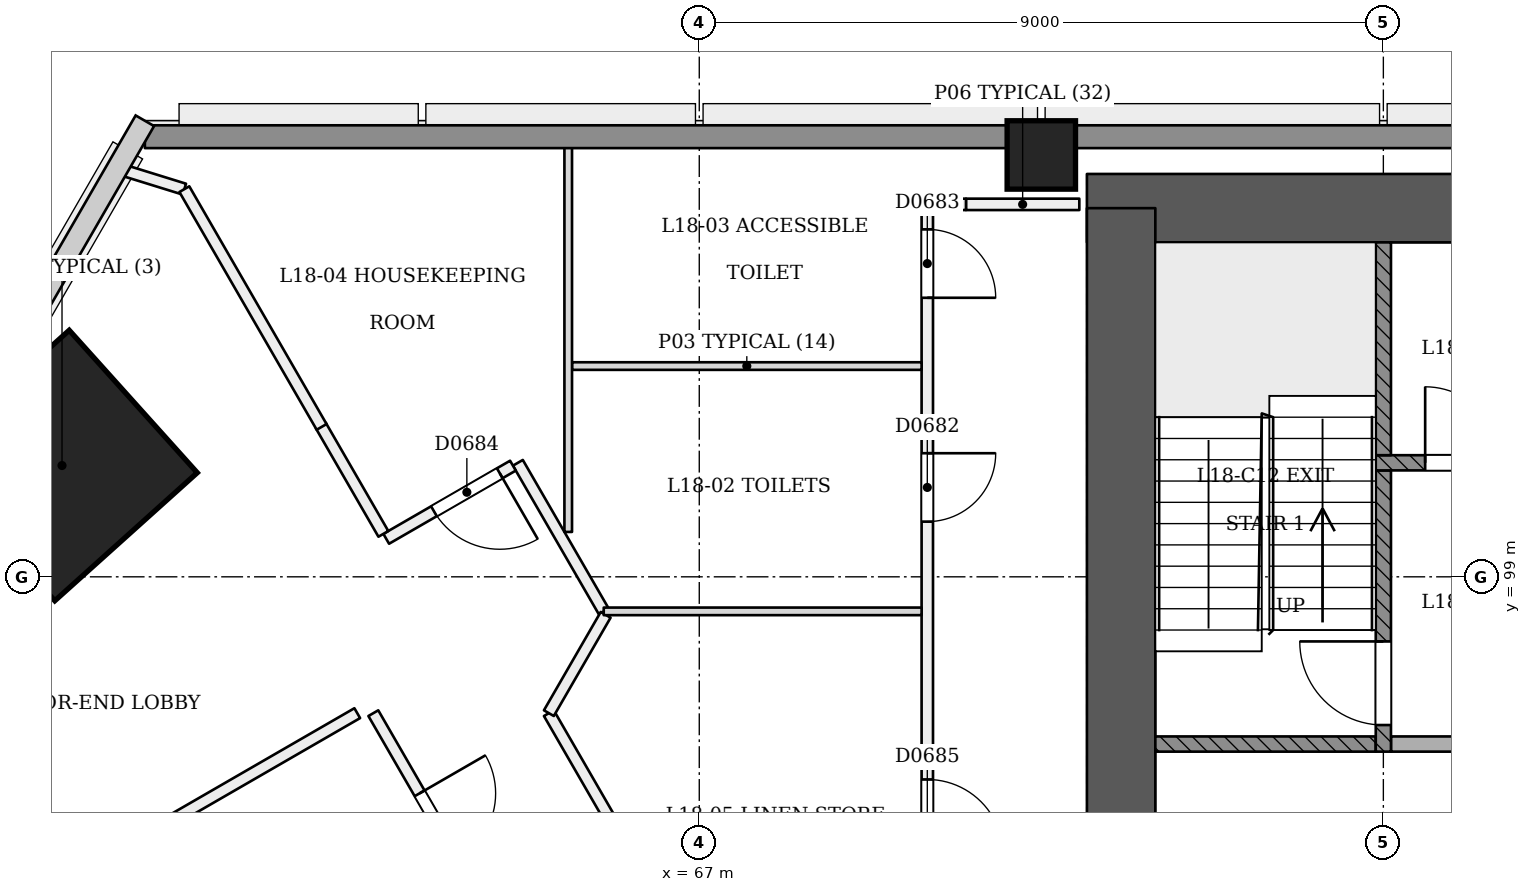
"""IFC4 building model, lengths in metres.
Left out: names, types, materials, properties, quantities, classifications, styles, units other than length and angle.
Written with IfcOpenShell. Run it as: python <this file> out.ifc"""

import sys

from ifc_helpers import new_model, si_unit, direction, frame, frame_2d, origin, origin_2d, place, context, subcontext, project, spatial, rectangle, extrude, element, fill, save


model = new_model("IFC4")
c1 = context("Model", 3, precision=1e-05, world=origin(), true_north=direction((0.0, 1.0)))
c2 = subcontext(c1, "Body", "Model", "MODEL_VIEW")
j1 = project(units=[si_unit("LENGTHUNIT", "METRE"), si_unit("PLANEANGLEUNIT", "RADIAN")], contexts=[c1])
p1 = place(None, origin())
s1 = spatial("IfcSite", under=j1, at=p1, CompositionType="ELEMENT")
p2 = place(p1, origin())
s2 = spatial("IfcBuilding", under=s1, at=p2, CompositionType="ELEMENT")
p3 = place(p2, frame((0.0, 0.0, 73.8)))
s3 = spatial("IfcBuildingStorey", under=s2, at=p3, CompositionType="ELEMENT", Elevation=73.8)
p4 = place(p3, frame((97.45, 103.85, 0.0), z_axis=(0.0, 0.0, 1.0), x_axis=(-1.0, 0.0, 0.0)))
e1 = element("IfcWall", 1, at=p4, inside=s3, PredefinedType="SHEAR", context=c2, shape_type="SweptSolid", body=[
    extrude(rectangle(XDim=25.35, YDim=0.9, at=frame_2d((12.675, 0.0))), origin(), (0.0, 0.0, 1.0), 3.6),
])
p5 = place(p3, frame((72.55, 103.85, 0.0), z_axis=(0.0, 0.0, 1.0), x_axis=(0.0, -1.0, 0.0)))
e2 = element("IfcWall", 2, at=p5, inside=s3, PredefinedType="SHEAR", context=c2, shape_type="SweptSolid", body=[
    extrude(rectangle(XDim=11.35, YDim=0.9, at=frame_2d((5.675, 0.0))), origin(), (0.0, 0.0, 1.0), 3.6),
])
p6 = place(p3, frame((58.582, 100.453, 0.0), z_axis=(0.028403721265, 0.009287135593, 0.999553389135), x_axis=(-0.866201868799, 0.499294814231, 0.019975258968)))
e3 = element("IfcColumn", 3, at=p6, inside=s3, PredefinedType="COLUMN", context=c2, shape_type="SweptSolid", body=[
    extrude(rectangle(XDim=2.52, YDim=2.52, at=origin_2d()), origin(), (0.0, 0.0, 1.0), 3.602),
])
p7 = place(p3, frame((71.5, 104.55, 0.0), z_axis=(0.0, 0.0, 1.0), x_axis=(1.0, 0.0, 0.0)))
e4 = element("IfcColumn", 4, at=p7, inside=s3, PredefinedType="COLUMN", context=c2, shape_type="SweptSolid", body=[
    extrude(rectangle(XDim=0.9, YDim=0.9, at=origin_2d()), origin(), (0.0, 0.0, 1.0), 3.6),
])
p8 = place(p3, frame((72.0, 103.9, 0.0), z_axis=(0.0, 0.0, 1.0), x_axis=(-1.0, 0.0, 0.0)))
e5 = element("IfcWall", 5, at=p8, inside=s3, PredefinedType="PARTITIONING", context=c2, shape_type="SweptSolid", body=[
    extrude(rectangle(XDim=1.491, YDim=0.15, at=frame_2d((0.746, 0.0))), origin(), (0.0, 0.0, 1.0), 3.1),
])
p9 = place(p3, frame((70.509, 103.9, 0.0), z_axis=(0.0, 0.0, 1.0), x_axis=(-1.0, 0.0, 0.0)))
e6 = element("IfcWall", 6, at=p9, inside=s3, PredefinedType="PARTITIONING", context=c2, shape_type="SweptSolid", body=[
    extrude(rectangle(XDim=0.434, YDim=0.15, at=frame_2d((0.217, 0.0))), origin(), (0.0, 0.0, 1.0), 2.6),
])
p10 = place(p3, frame((65.743, 98.545, 0.0), z_axis=(0.0, 0.0, 1.0), x_axis=(-0.500383896675, 0.865803647456, 0.0)))
e7 = element("IfcWall", 7, at=p10, inside=s3, PredefinedType="PARTITIONING", context=c2, shape_type="SweptSolid", body=[
    extrude(rectangle(XDim=2.258, YDim=0.15, at=frame_2d((1.129, 0.0))), origin(), (0.0, 0.0, 1.0), 3.1),
])
p11 = place(p3, frame((64.549, 100.462, 0.0), z_axis=(0.0, 0.0, 1.0), x_axis=(-0.866033512162, -0.499985955615, 0.0)))
e8 = element("IfcWall", 8, at=p11, inside=s3, PredefinedType="PARTITIONING", context=c2, shape_type="SweptSolid", body=[
    extrude(rectangle(XDim=1.925, YDim=0.15, at=frame_2d((0.962, 0.0))), origin(), (0.0, 0.0, 1.0), 3.1),
])
p12 = place(p11, frame((0.2, 0.0, 0.0)))
e9 = element("IfcOpeningElement", 9, at=p12, cuts=e8, PredefinedType="OPENING", context=c2, shape_type="SweptSolid", body=[
    extrude(rectangle(XDim=1.0, YDim=2.1, at=frame_2d((0.5, 1.05))), frame((0.0, 0.085, 0.0), z_axis=(0.0, -1.0, 0.0), x_axis=(1.0, 0.0, 0.0)), (0.0, 0.0, 1.0), 0.171),
])
p13 = place(p3, frame((62.844, 99.565, 0.0), z_axis=(0.0, 0.0, 1.0), x_axis=(-0.50001794124, 0.866015045157, 0.0)))
e10 = element("IfcWall", 10, at=p13, inside=s3, PredefinedType="PARTITIONING", context=c2, shape_type="SweptSolid", body=[
    extrude(rectangle(XDim=1.645, YDim=0.15, at=frame_2d((0.823, 0.0))), origin(), (0.0, 0.0, 1.0), 3.1),
])
p14 = place(p3, frame((70.0, 103.9, 0.0), z_axis=(0.0, 0.0, 1.0), x_axis=(0.0, -1.0, 0.0)))
e11 = element("IfcWall", 11, at=p14, inside=s3, PredefinedType="PARTITIONING", context=c2, shape_type="SweptSolid", body=[
    extrude(rectangle(XDim=11.5, YDim=0.15, at=frame_2d((5.75, 0.0))), origin(), (0.0, 0.0, 1.0), 2.6),
])
p15 = place(p14, frame((3.274, 0.0, 0.0)))
e12 = element("IfcOpeningElement", 12, at=p15, cuts=e11, PredefinedType="OPENING", context=c2, shape_type="SweptSolid", body=[
    extrude(rectangle(XDim=0.9, YDim=2.1, at=frame_2d((0.45, 1.05))), frame((0.0, 0.085, 0.0), z_axis=(0.0, -1.0, 0.0), x_axis=(1.0, 0.0, 0.0)), (0.0, 0.0, 1.0), 0.171),
])
p16 = place(p14, frame((0.329, 0.0, 0.0)))
e13 = element("IfcOpeningElement", 13, at=p16, cuts=e11, PredefinedType="OPENING", context=c2, shape_type="SweptSolid", body=[
    extrude(rectangle(XDim=0.9, YDim=2.1, at=frame_2d((0.45, 1.05))), frame((0.0, 0.085, 0.0), z_axis=(0.0, -1.0, 0.0), x_axis=(1.0, 0.0, 0.0)), (0.0, 0.0, 1.0), 0.171),
])
p17 = place(p14, frame((7.566, 0.0, 0.0)))
e14 = element("IfcOpeningElement", 14, at=p17, cuts=e11, PredefinedType="OPENING", context=c2, shape_type="SweptSolid", body=[
    extrude(rectangle(XDim=1.0, YDim=2.1, at=frame_2d((0.5, 1.05))), frame((0.0, 0.085, 0.0), z_axis=(0.0, -1.0, 0.0), x_axis=(1.0, 0.0, 0.0)), (0.0, 0.0, 1.0), 0.171),
])
p18 = place(p3, frame((67.796, 92.4, 0.0), z_axis=(0.0, 0.0, 1.0), x_axis=(-0.499990275446, 0.866031018186, 0.0)))
e15 = element("IfcWall", 15, at=p18, inside=s3, PredefinedType="PARTITIONING", context=c2, shape_type="SweptSolid", body=[
    extrude(rectangle(XDim=5.55, YDim=0.15, at=frame_2d((2.775, 0.0))), origin(), (0.0, 0.0, 1.0), 3.1),
])
p19 = place(p3, frame((65.021, 97.206, 0.0), z_axis=(0.0, 0.0, 1.0), x_axis=(0.500076103225, 0.865981461108, 0.0)))
e16 = element("IfcWall", 16, at=p19, inside=s3, PredefinedType="PARTITIONING", context=c2, shape_type="SweptSolid", body=[
    extrude(rectangle(XDim=1.494, YDim=0.15, at=frame_2d((0.747, 0.0))), origin(), (0.0, 0.0, 1.0), 3.1),
])
p20 = place(p3, frame((62.712, 97.206, 0.0), z_axis=(0.0, 0.0, 1.0), x_axis=(0.500014659176, -0.86601694014, 0.0)))
e17 = element("IfcWall", 17, at=p20, inside=s3, PredefinedType="PARTITIONING", context=c2, shape_type="SweptSolid", body=[
    extrude(rectangle(XDim=7.859, YDim=0.15, at=frame_2d((3.93, 0.0))), origin(), (0.0, 0.0, 1.0), 2.7),
])
p21 = place(p20, frame((1.218, 0.0, 0.0)))
e18 = element("IfcOpeningElement", 18, at=p21, cuts=e17, PredefinedType="OPENING", context=c2, shape_type="SweptSolid", body=[
    extrude(rectangle(XDim=1.0, YDim=2.1, at=frame_2d((0.5, 1.05))), frame((0.0, 0.085, 0.0), z_axis=(0.0, -1.0, 0.0), x_axis=(1.0, 0.0, 0.0)), (0.0, 0.0, 1.0), 0.171),
])
p22 = place(p20, frame((4.112, 0.0, 0.0)))
e19 = element("IfcOpeningElement", 19, at=p22, cuts=e17, PredefinedType="OPENING", context=c2, shape_type="SweptSolid", body=[
    extrude(rectangle(XDim=1.1, YDim=2.1, at=frame_2d((0.55, 1.05))), frame((0.0, 0.085, 0.0), z_axis=(0.0, -1.0, 0.0), x_axis=(1.0, 0.0, 0.0)), (0.0, 0.0, 1.0), 0.171),
])
p23 = place(p3, frame((69.925, 101.773, 0.0), z_axis=(0.0, 0.0, 1.0), x_axis=(-1.0, 0.0, 0.0)))
e20 = element("IfcWall", 20, at=p23, inside=s3, PredefinedType="PARTITIONING", context=c2, shape_type="SweptSolid", body=[
    extrude(rectangle(XDim=4.599, YDim=0.1, at=frame_2d((2.3, 0.0))), origin(), (0.0, 0.0, 1.0), 3.1),
])
p24 = place(p3, frame((65.743, 98.545, 0.0), z_axis=(0.0, 0.0, 1.0), x_axis=(1.0, 0.0, 0.0)))
e21 = element("IfcWall", 21, at=p24, inside=s3, PredefinedType="PARTITIONING", context=c2, shape_type="SweptSolid", body=[
    extrude(rectangle(XDim=4.182, YDim=0.1, at=frame_2d((2.091, 0.0))), origin(), (0.0, 0.0, 1.0), 3.1),
])
p25 = place(p3, frame((65.276, 104.9, 0.0), z_axis=(0.0, 0.0, 1.0), x_axis=(0.0, -1.0, 0.0)))
e22 = element("IfcWall", 22, at=p25, inside=s3, PredefinedType="PARTITIONING", context=c2, shape_type="SweptSolid", body=[
    extrude(rectangle(XDim=5.309, YDim=0.1, at=frame_2d((2.655, 0.0))), origin(), (0.0, 0.0, 1.0), 2.6),
])
p26 = place(p3, frame((59.422, 104.349, 0.0), z_axis=(0.0, 0.0, 1.0), x_axis=(0.955225394117, -0.295879107804, 0.0)))
e23 = element("IfcWall", 23, at=p26, inside=s3, PredefinedType="PARTITIONING", context=c2, shape_type="SweptSolid", body=[
    extrude(rectangle(XDim=0.842, YDim=0.15, at=frame_2d((0.421, 0.0))), origin(), (0.0, 0.0, 1.0), 3.1),
])
p27 = place(p3, frame((60.226, 104.1, 0.0), z_axis=(0.0, 0.0, 1.0), x_axis=(0.499999409447, -0.86602574474, 0.0)))
e24 = element("IfcWall", 24, at=p27, inside=s3, PredefinedType="PARTITIONING", context=c2, shape_type="SweptSolid", body=[
    extrude(rectangle(XDim=3.612, YDim=0.15, at=frame_2d((1.806, 0.0))), origin(), (0.0, 0.0, 1.0), 2.6),
])
p28 = place(p3, frame((57.099, 94.088, 0.0), z_axis=(0.0, 0.0, 1.0), x_axis=(0.866030443922, 0.499991270124, 0.0)))
e25 = element("IfcWall", 25, at=p28, inside=s3, PredefinedType="PARTITIONING", context=c2, shape_type="SweptSolid", body=[
    extrude(rectangle(XDim=6.237, YDim=0.15, at=frame_2d((3.118, 0.0))), origin(), (0.0, 0.0, 1.0), 2.6),
])
p29 = place(p3, frame((59.706, 104.79, 0.0), z_axis=(0.0, 0.0, 1.0), x_axis=(1.0, 0.0, 0.0)))
e26 = element("IfcWall", 26, at=p29, inside=s3, PredefinedType="SOLIDWALL", context=c2, shape_type="SweptSolid", body=[
    extrude(rectangle(XDim=50.588, YDim=0.3, at=frame_2d((25.294, 0.0))), origin(), (0.0, 0.0, 1.0), 2.6),
])
p30 = place(p3, frame((73.0, 96.8, 0.0), z_axis=(0.0, 0.0, 1.0), x_axis=(1.0, 0.0, 0.0)))
e27 = element("IfcWall", 27, at=p30, inside=s3, PredefinedType="SOLIDWALL", context=c2, shape_type="SweptSolid", body=[
    extrude(rectangle(XDim=2.9, YDim=0.2, at=frame_2d((1.45, 0.0))), origin(), (0.0, 0.0, 1.0), 3.1),
])
p31 = place(p3, frame((76.0, 96.7, 0.0), z_axis=(0.0, 0.0, 1.0), x_axis=(0.0, 1.0, 0.0)))
e28 = element("IfcWall", 28, at=p31, inside=s3, PredefinedType="SOLIDWALL", context=c2, shape_type="SweptSolid", body=[
    extrude(rectangle(XDim=3.7, YDim=0.2, at=frame_2d((1.85, 0.0))), origin(), (0.0, 0.0, 1.0), 3.1),
])
p32 = place(p31, frame((0.35, 0.0, 0.0)))
e29 = element("IfcOpeningElement", 29, at=p32, cuts=e28, PredefinedType="OPENING", context=c2, shape_type="SweptSolid", body=[
    extrude(rectangle(XDim=1.1, YDim=2.1, at=frame_2d((0.55, 1.05))), frame((0.0, 0.11, 0.0), z_axis=(0.0, -1.0, 0.0), x_axis=(1.0, 0.0, 0.0)), (0.0, 0.0, 1.0), 0.221),
])
p33 = place(p3, frame((76.1, 96.8, 0.0), z_axis=(0.0, 0.0, 1.0), x_axis=(1.0, 0.0, 0.0)))
e30 = element("IfcWall", 30, at=p33, inside=s3, PredefinedType="PARTITIONING", context=c2, shape_type="SweptSolid", body=[
    extrude(rectangle(XDim=1.9, YDim=0.2, at=frame_2d((0.95, 0.0))), origin(), (0.0, 0.0, 1.0), 3.1),
])
p34 = place(p3, frame((75.9, 100.5, 0.0), z_axis=(0.0, 0.0, 1.0), x_axis=(1.0, 0.0, 0.0)))
e31 = element("IfcWall", 31, at=p34, inside=s3, PredefinedType="SOLIDWALL", context=c2, shape_type="SweptSolid", body=[
    extrude(rectangle(XDim=18.2, YDim=0.2, at=frame_2d((9.1, 0.0))), origin(), (0.0, 0.0, 1.0), 3.1),
])
p35 = place(p34, frame((2.6, 0.0, 0.0)))
e32 = element("IfcOpeningElement", 32, at=p35, cuts=e31, PredefinedType="OPENING", context=c2, shape_type="SweptSolid", body=[
    extrude(rectangle(XDim=1.1, YDim=2.1, at=frame_2d((0.55, 1.05))), frame((0.0, 0.11, 0.0), z_axis=(0.0, -1.0, 0.0), x_axis=(1.0, 0.0, 0.0)), (0.0, 0.0, 1.0), 0.221),
])
p36 = place(p34, frame((4.5, 0.0, 0.0)))
e33 = element("IfcOpeningElement", 33, at=p36, cuts=e31, PredefinedType="OPENING", context=c2, shape_type="SweptSolid", body=[
    extrude(rectangle(XDim=1.1, YDim=2.1, at=frame_2d((0.55, 1.05))), frame((0.0, 0.11, 0.0), z_axis=(0.0, -1.0, 0.0), x_axis=(1.0, 0.0, 0.0)), (0.0, 0.0, 1.0), 0.221),
])
p37 = place(p34, frame((6.4, 0.0, 0.0)))
e34 = element("IfcOpeningElement", 34, at=p37, cuts=e31, PredefinedType="OPENING", context=c2, shape_type="SweptSolid", body=[
    extrude(rectangle(XDim=1.1, YDim=2.1, at=frame_2d((0.55, 1.05))), frame((0.0, 0.11, 0.0), z_axis=(0.0, -1.0, 0.0), x_axis=(1.0, 0.0, 0.0)), (0.0, 0.0, 1.0), 0.221),
])
p38 = place(p34, frame((8.3, 0.0, 0.0)))
e35 = element("IfcOpeningElement", 35, at=p38, cuts=e31, PredefinedType="OPENING", context=c2, shape_type="SweptSolid", body=[
    extrude(rectangle(XDim=1.1, YDim=2.1, at=frame_2d((0.55, 1.05))), frame((0.0, 0.11, 0.0), z_axis=(0.0, -1.0, 0.0), x_axis=(1.0, 0.0, 0.0)), (0.0, 0.0, 1.0), 0.221),
])
p39 = place(p34, frame((10.2, 0.0, 0.0)))
e36 = element("IfcOpeningElement", 36, at=p39, cuts=e31, PredefinedType="OPENING", context=c2, shape_type="SweptSolid", body=[
    extrude(rectangle(XDim=1.1, YDim=2.1, at=frame_2d((0.55, 1.05))), frame((0.0, 0.11, 0.0), z_axis=(0.0, -1.0, 0.0), x_axis=(1.0, 0.0, 0.0)), (0.0, 0.0, 1.0), 0.221),
])
p40 = place(p34, frame((12.1, 0.0, 0.0)))
e37 = element("IfcOpeningElement", 37, at=p40, cuts=e31, PredefinedType="OPENING", context=c2, shape_type="SweptSolid", body=[
    extrude(rectangle(XDim=1.1, YDim=2.1, at=frame_2d((0.55, 1.05))), frame((0.0, 0.11, 0.0), z_axis=(0.0, -1.0, 0.0), x_axis=(1.0, 0.0, 0.0)), (0.0, 0.0, 1.0), 0.221),
])
p41 = place(p34, frame((14.0, 0.0, 0.0)))
e38 = element("IfcOpeningElement", 38, at=p41, cuts=e31, PredefinedType="OPENING", context=c2, shape_type="SweptSolid", body=[
    extrude(rectangle(XDim=1.1, YDim=2.1, at=frame_2d((0.55, 1.05))), frame((0.0, 0.11, 0.0), z_axis=(0.0, -1.0, 0.0), x_axis=(1.0, 0.0, 0.0)), (0.0, 0.0, 1.0), 0.221),
])
p42 = place(p34, frame((0.65, 0.0, 0.0)))
e39 = element("IfcOpeningElement", 39, at=p42, cuts=e31, PredefinedType="OPENING", context=c2, shape_type="SweptSolid", body=[
    extrude(rectangle(XDim=1.0, YDim=2.1, at=frame_2d((0.5, 1.05))), frame((0.0, 0.11, 0.0), z_axis=(0.0, -1.0, 0.0), x_axis=(1.0, 0.0, 0.0)), (0.0, 0.0, 1.0), 0.221),
])
p43 = place(p34, frame((16.3, 0.0, 0.0)))
e40 = element("IfcOpeningElement", 40, at=p43, cuts=e31, PredefinedType="OPENING", context=c2, shape_type="SweptSolid", body=[
    extrude(rectangle(XDim=1.0, YDim=2.1, at=frame_2d((0.5, 1.05))), frame((0.0, 0.11, 0.0), z_axis=(0.0, -1.0, 0.0), x_axis=(1.0, 0.0, 0.0)), (0.0, 0.0, 1.0), 0.221),
])
p44 = place(p3, frame((76.0, 100.6, 0.0), z_axis=(0.0, 0.0, 1.0), x_axis=(0.0, 1.0, 0.0)))
e41 = element("IfcWall", 41, at=p44, inside=s3, PredefinedType="SOLIDWALL", context=c2, shape_type="SweptSolid", body=[
    extrude(rectangle(XDim=2.8, YDim=0.2, at=frame_2d((1.4, 0.0))), origin(), (0.0, 0.0, 1.0), 3.1),
])
p45 = place(p15, origin())
e42 = element("IfcDoor", 42, at=p45, inside=s3, OperationType="SINGLE_SWING_LEFT", PredefinedType="NOTDEFINED", context=c2, shape_type="SweptSolid", body=[
    extrude(rectangle(XDim=0.9, YDim=2.1, at=frame_2d((0.45, 1.05))), frame((0.0, 0.025, 0.0), z_axis=(0.0, -1.0, 0.0), x_axis=(1.0, 0.0, 0.0)), (0.0, 0.0, 1.0), 0.05),
])
fill(e12, e42)
p46 = place(p16, origin())
e43 = element("IfcDoor", 43, at=p46, inside=s3, OperationType="SINGLE_SWING_RIGHT", PredefinedType="NOTDEFINED", context=c2, shape_type="SweptSolid", body=[
    extrude(rectangle(XDim=0.9, YDim=2.1, at=frame_2d((0.45, 1.05))), frame((0.0, 0.025, 0.0), z_axis=(0.0, -1.0, 0.0), x_axis=(1.0, 0.0, 0.0)), (0.0, 0.0, 1.0), 0.05),
])
fill(e13, e43)
p47 = place(p12, origin())
e44 = element("IfcDoor", 44, at=p47, inside=s3, OperationType="SINGLE_SWING_LEFT", PredefinedType="NOTDEFINED", context=c2, shape_type="SweptSolid", body=[
    extrude(rectangle(XDim=1.0, YDim=2.1, at=frame_2d((0.5, 1.05))), frame((0.0, 0.025, 0.0), z_axis=(0.0, -1.0, 0.0), x_axis=(1.0, 0.0, 0.0)), (0.0, 0.0, 1.0), 0.05),
])
fill(e9, e44)
p48 = place(p17, origin())
e45 = element("IfcDoor", 45, at=p48, inside=s3, OperationType="SINGLE_SWING_RIGHT", PredefinedType="NOTDEFINED", context=c2, shape_type="SweptSolid", body=[
    extrude(rectangle(XDim=1.0, YDim=2.1, at=frame_2d((0.5, 1.05))), frame((0.0, 0.025, 0.0), z_axis=(0.0, -1.0, 0.0), x_axis=(1.0, 0.0, 0.0)), (0.0, 0.0, 1.0), 0.05),
])
fill(e14, e45)
p49 = place(p21, origin())
e46 = element("IfcDoor", 46, at=p49, inside=s3, OperationType="SINGLE_SWING_LEFT", PredefinedType="NOTDEFINED", context=c2, shape_type="SweptSolid", body=[
    extrude(rectangle(XDim=1.0, YDim=2.1, at=frame_2d((0.5, 1.05))), frame((0.0, 0.025, 0.0), z_axis=(0.0, -1.0, 0.0), x_axis=(1.0, 0.0, 0.0)), (0.0, 0.0, 1.0), 0.05),
])
fill(e18, e46)
p50 = place(p32, origin())
e47 = element("IfcDoor", 47, at=p50, inside=s3, OperationType="SINGLE_SWING_RIGHT", PredefinedType="NOTDEFINED", context=c2, shape_type="SweptSolid", body=[
    extrude(rectangle(XDim=1.1, YDim=2.1, at=frame_2d((0.55, 1.05))), frame((0.0, 0.025, 0.0), z_axis=(0.0, -1.0, 0.0), x_axis=(1.0, 0.0, 0.0)), (0.0, 0.0, 1.0), 0.05),
])
fill(e29, e47)
p51 = place(p42, origin())
e48 = element("IfcDoor", 48, at=p51, inside=s3, OperationType="SINGLE_SWING_LEFT", PredefinedType="NOTDEFINED", context=c2, shape_type="SweptSolid", body=[
    extrude(rectangle(XDim=1.0, YDim=2.1, at=frame_2d((0.5, 1.05))), frame((0.0, 0.025, 0.0), z_axis=(0.0, -1.0, 0.0), x_axis=(1.0, 0.0, 0.0)), (0.0, 0.0, 1.0), 0.05),
])
fill(e39, e48)
save(model, sys.argv[1])
